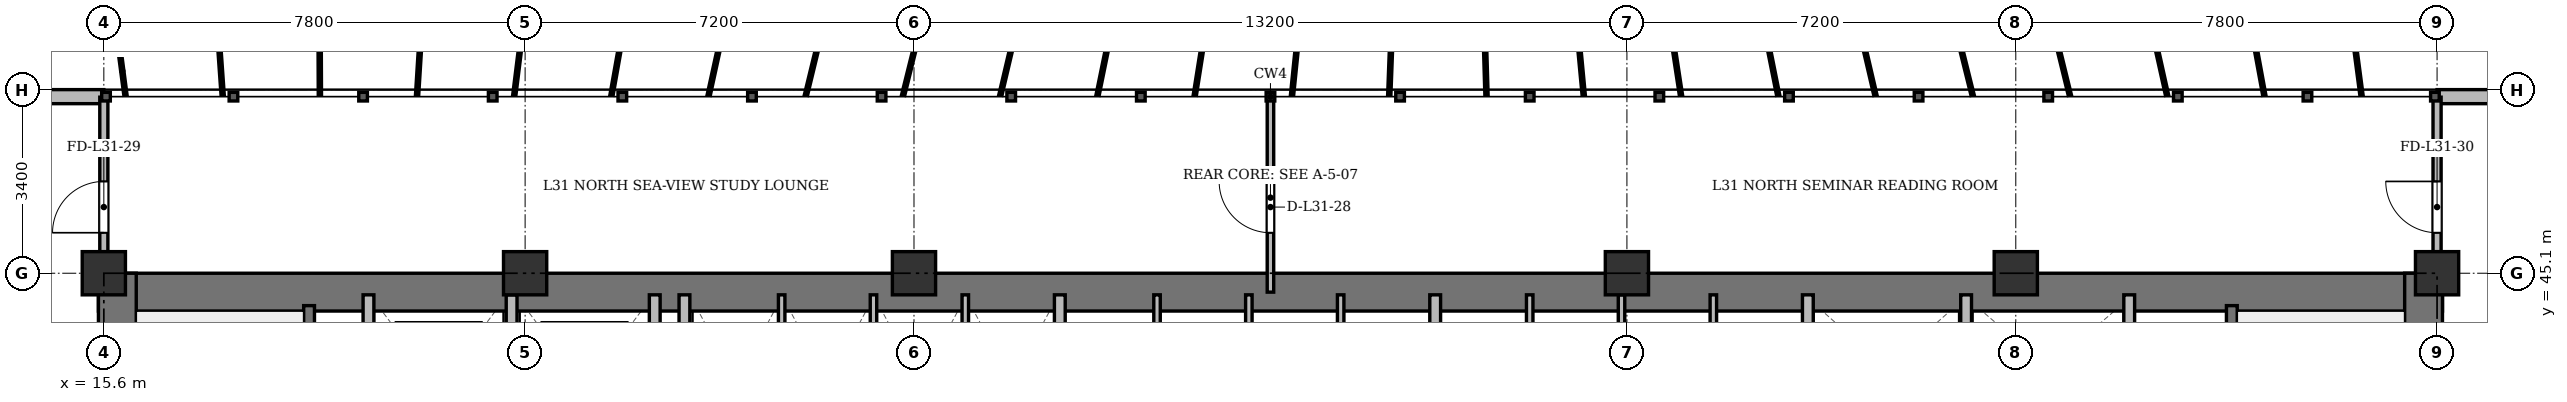
"""IFC4 building model, lengths in metres.
Left out: names, types, materials, properties, quantities, classifications, styles, units other than length and angle.
Written with IfcOpenShell. Run it as: python <this file> out.ifc"""

import sys

from ifc_helpers import new_model, si_unit, direction, frame, frame_2d, origin, origin_2d, place, context, subcontext, project, spatial, rectangle, extrude, source, transform, mapped, element, fill, save


model = new_model("IFC4")
c1 = context("Model", 3, precision=1e-05, world=origin(), true_north=direction((0.0, 1.0)))
c2 = subcontext(c1, "Body", "Model", "MODEL_VIEW")
j1 = project(units=[si_unit("LENGTHUNIT", "METRE"), si_unit("PLANEANGLEUNIT", "RADIAN")], contexts=[c1])
p1 = place(None, origin())
s1 = spatial("IfcSite", under=j1, at=p1, CompositionType="ELEMENT")
p2 = place(p1, origin())
s2 = spatial("IfcBuilding", under=s1, at=p2, CompositionType="ELEMENT")
p3 = place(p2, frame((0.0, 0.0, 121.3)))
s3 = spatial("IfcBuildingStorey", under=s2, at=p3, CompositionType="ELEMENT", Elevation=121.3)
m1 = source(origin(), c2, "Body", "SweptSolid", [
    extrude(rectangle(XDim=0.8, YDim=0.8, at=origin_2d()), origin(), (0.0, 0.0, 1.0), 3.6),
])
for number, where, z_axis, x_axis in (
    (1, (15.6, 45.1, 0.0), (0.0, 0.0, 1.0), (1.0, 0.0, 0.0)),
    (2, (23.4, 45.1, 0.0), (0.0, 0.0, 1.0), (1.0, 0.0, 0.0)),
    (3, (30.6, 45.1, 0.0), (0.0, 0.0, 1.0), (1.0, 0.0, 0.0)),
    (4, (43.8, 45.1, 0.0), (0.0, 0.0, 1.0), (1.0, 0.0, 0.0)),
    (5, (51.0, 45.1, 0.0), (0.0, 0.0, 1.0), (1.0, 0.0, 0.0)),
    (6, (58.8, 45.1, 0.0), (0.0, 0.0, 1.0), (1.0, 0.0, 0.0)),
):
    element("IfcColumn", number, at=place(p3, frame(where, z_axis=z_axis, x_axis=x_axis)), inside=s3, PredefinedType="COLUMN", context=c2, shape_type="MappedRepresentation", body=[
        mapped(m1, transform((0.0, 0.0, 0.0), x_axis=(1.0, 0.0, 0.0), y_axis=(0.0, 1.0, 0.0), z_axis=(0.0, 0.0, 1.0), scale=1.0)),
    ])
p4 = place(p3, frame((7.6, 48.37, 0.0), z_axis=(0.0, 0.0, 1.0), x_axis=(1.0, 0.0, 0.0)))
e7 = element("IfcWall", 7, at=p4, inside=s3, PredefinedType="SOLIDWALL", context=c2, shape_type="SweptSolid", body=[
    extrude(rectangle(XDim=8.0, YDim=0.26, at=frame_2d((4.0, 0.0))), origin(), (0.0, 0.0, 1.0), 3.34),
])
p5 = place(p4, frame((3.325, 0.0, 0.9)))
e8 = element("IfcOpeningElement", 8, at=p5, cuts=e7, PredefinedType="OPENING", context=c2, shape_type="SweptSolid", body=[
    extrude(rectangle(XDim=1.35, YDim=1.5, at=frame_2d((0.675, 0.75))), frame((0.0, 0.14, 0.0), z_axis=(0.0, -1.0, 0.0), x_axis=(1.0, 0.0, 0.0)), (0.0, 0.0, 1.0), 0.28),
])
p6 = place(p3, frame((58.8, 48.37, 0.0), z_axis=(0.0, 0.0, 1.0), x_axis=(1.0, 0.0, 0.0)))
e9 = element("IfcWall", 9, at=p6, inside=s3, PredefinedType="SOLIDWALL", context=c2, shape_type="SweptSolid", body=[
    extrude(rectangle(XDim=8.0, YDim=0.26, at=frame_2d((4.0, 0.0))), origin(), (0.0, 0.0, 1.0), 3.34),
])
p7 = place(p6, frame((2.209, 0.0, 0.9)))
e10 = element("IfcOpeningElement", 10, at=p7, cuts=e9, PredefinedType="OPENING", context=c2, shape_type="SweptSolid", body=[
    extrude(rectangle(XDim=1.35, YDim=1.5, at=frame_2d((0.675, 0.75))), frame((0.0, 0.14, 0.0), z_axis=(0.0, -1.0, 0.0), x_axis=(1.0, 0.0, 0.0)), (0.0, 0.0, 1.0), 0.28),
])
p8 = place(p6, frame((6.033, 0.0, 0.9)))
e11 = element("IfcOpeningElement", 11, at=p8, cuts=e9, PredefinedType="OPENING", context=c2, shape_type="SweptSolid", body=[
    extrude(rectangle(XDim=1.2, YDim=1.65, at=frame_2d((0.6, 0.825))), frame((0.0, 0.14, 0.0), z_axis=(0.0, -1.0, 0.0), x_axis=(1.0, 0.0, 0.0)), (0.0, 0.0, 1.0), 0.28),
])
p9 = place(p3, frame((15.5, 44.75, 0.0), z_axis=(0.0, 0.0, 1.0), x_axis=(1.0, 0.0, 0.0)))
e12 = element("IfcWall", 12, at=p9, inside=s3, PredefinedType="SHEAR", context=c2, shape_type="SweptSolid", body=[
    extrude(rectangle(XDim=43.4, YDim=0.7, at=frame_2d((21.7, 0.0))), origin(), (0.0, 0.0, 1.0), 3.34),
])
for number, where, z_axis, x_axis in (
    (13, (15.85, 33.4, 0.0), (0.0, 0.0, 1.0), (0.0, 1.0, 0.0)),
    (14, (58.55, 33.4, 0.0), (0.0, 0.0, 1.0), (0.0, 1.0, 0.0)),
):
    element("IfcWall", number, at=place(p3, frame(where, z_axis=z_axis, x_axis=x_axis)), inside=s3, PredefinedType="SHEAR", context=c2, shape_type="SweptSolid", body=[
        extrude(rectangle(XDim=11.7, YDim=0.7, at=frame_2d((5.85, 0.0))), origin(), (0.0, 0.0, 1.0), 3.34),
    ])
p10 = place(p3, frame((19.4, 33.4, 0.0), z_axis=(0.0, 0.0, 1.0), x_axis=(0.0, 1.0, 0.0)))
e15 = element("IfcWall", 15, at=p10, inside=s3, PredefinedType="SHEAR", context=c2, shape_type="SweptSolid", body=[
    extrude(rectangle(XDim=11.1, YDim=0.2, at=frame_2d((5.55, 0.0))), origin(), (0.0, 0.0, 1.0), 3.34),
])
p11 = place(p10, frame((0.85, 0.0, 0.0)))
e16 = element("IfcOpeningElement", 16, at=p11, cuts=e15, PredefinedType="OPENING", context=c2, shape_type="SweptSolid", body=[
    extrude(rectangle(XDim=1.1, YDim=2.15, at=frame_2d((0.55, 1.075))), frame((0.0, 0.11, 0.0), z_axis=(0.0, -1.0, 0.0), x_axis=(1.0, 0.0, 0.0)), (0.0, 0.0, 1.0), 0.22),
])
p12 = place(p3, frame((55.0, 33.4, 0.0), z_axis=(0.0, 0.0, 1.0), x_axis=(0.0, 1.0, 0.0)))
e17 = element("IfcWall", 17, at=p12, inside=s3, PredefinedType="SHEAR", context=c2, shape_type="SweptSolid", body=[
    extrude(rectangle(XDim=11.1, YDim=0.2, at=frame_2d((5.55, 0.0))), origin(), (0.0, 0.0, 1.0), 3.34),
])
p13 = place(p12, frame((0.85, 0.0, 0.0)))
e18 = element("IfcOpeningElement", 18, at=p13, cuts=e17, PredefinedType="OPENING", context=c2, shape_type="SweptSolid", body=[
    extrude(rectangle(XDim=1.1, YDim=2.15, at=frame_2d((0.55, 1.075))), frame((0.0, 0.11, 0.0), z_axis=(0.0, -1.0, 0.0), x_axis=(1.0, 0.0, 0.0)), (0.0, 0.0, 1.0), 0.22),
])
for number, where, z_axis, x_axis in (
    (19, (20.5, 41.3, 0.0), (0.0, 0.0, 1.0), (0.0, 1.0, 0.0)),
    (20, (23.15, 41.3, 0.0), (0.0, 0.0, 1.0), (0.0, 1.0, 0.0)),
    (21, (25.8, 41.3, 0.0), (0.0, 0.0, 1.0), (0.0, 1.0, 0.0)),
):
    element("IfcWall", number, at=place(p3, frame(where, z_axis=z_axis, x_axis=x_axis)), inside=s3, PredefinedType="SOLIDWALL", context=c2, shape_type="SweptSolid", body=[
        extrude(rectangle(XDim=3.4, YDim=0.2, at=frame_2d((1.7, 0.0))), origin(), (0.0, 0.0, 1.0), 3.34),
    ])
p14 = place(p3, frame((26.35, 33.4, 0.0), z_axis=(0.0, 0.0, 1.0), x_axis=(0.0, 1.0, 0.0)))
e22 = element("IfcWall", 22, at=p14, inside=s3, PredefinedType="SOLIDWALL", context=c2, shape_type="SweptSolid", body=[
    extrude(rectangle(XDim=11.3, YDim=0.2, at=frame_2d((5.65, 0.0))), origin(), (0.0, 0.0, 1.0), 2.752),
])
p15 = place(p3, frame((33.3, 41.5, 0.0), z_axis=(0.0, 0.0, 1.0), x_axis=(0.0, 1.0, 0.0)))
e23 = element("IfcWall", 23, at=p15, inside=s3, PredefinedType="SOLIDWALL", context=c2, shape_type="SweptSolid", body=[
    extrude(rectangle(XDim=3.2, YDim=0.2, at=frame_2d((1.6, 0.0))), origin(), (0.0, 0.0, 1.0), 3.34),
])
for number, where, z_axis, x_axis in (
    (24, (28.15, 41.5, 0.0), (0.0, 0.0, 1.0), (0.0, 1.0, 0.0)),
    (25, (29.85, 41.5, 0.0), (0.0, 0.0, 1.0), (0.0, 1.0, 0.0)),
    (26, (31.55, 41.5, 0.0), (0.0, 0.0, 1.0), (0.0, 1.0, 0.0)),
    (27, (35.1, 41.5, 0.0), (0.0, 0.0, 1.0), (0.0, 1.0, 0.0)),
    (28, (36.8, 41.5, 0.0), (0.0, 0.0, 1.0), (0.0, 1.0, 0.0)),
    (29, (38.5, 41.5, 0.0), (0.0, 0.0, 1.0), (0.0, 1.0, 0.0)),
):
    element("IfcWall", number, at=place(p3, frame(where, z_axis=z_axis, x_axis=x_axis)), inside=s3, PredefinedType="PARTITIONING", context=c2, shape_type="SweptSolid", body=[
        extrude(rectangle(XDim=3.2, YDim=0.12, at=frame_2d((1.6, 0.0))), origin(), (0.0, 0.0, 1.0), 3.34),
    ])
p16 = place(p3, frame((40.25, 41.5, 0.0), z_axis=(0.0, 0.0, 1.0), x_axis=(0.0, 1.0, 0.0)))
e30 = element("IfcWall", 30, at=p16, inside=s3, PredefinedType="SOLIDWALL", context=c2, shape_type="SweptSolid", body=[
    extrude(rectangle(XDim=3.2, YDim=0.2, at=frame_2d((1.6, 0.0))), origin(), (0.0, 0.0, 1.0), 3.34),
])
p17 = place(p3, frame((42.0, 41.5, 0.0), z_axis=(0.0, 0.0, 1.0), x_axis=(0.0, 1.0, 0.0)))
e31 = element("IfcWall", 31, at=p17, inside=s3, PredefinedType="PARTITIONING", context=c2, shape_type="SweptSolid", body=[
    extrude(rectangle(XDim=3.2, YDim=0.12, at=frame_2d((1.6, 0.0))), origin(), (0.0, 0.0, 1.0), 3.34),
])
p18 = place(p3, frame((43.7, 41.5, 0.0), z_axis=(0.0, 0.0, 1.0), x_axis=(0.0, 1.0, 0.0)))
e32 = element("IfcWall", 32, at=p18, inside=s3, PredefinedType="PARTITIONING", context=c2, shape_type="SweptSolid", body=[
    extrude(rectangle(XDim=3.2, YDim=0.12, at=frame_2d((1.6, 0.0))), origin(), (0.0, 0.0, 1.0), 2.84),
])
p19 = place(p3, frame((45.4, 41.5, 0.0), z_axis=(0.0, 0.0, 1.0), x_axis=(0.0, 1.0, 0.0)))
e33 = element("IfcWall", 33, at=p19, inside=s3, PredefinedType="PARTITIONING", context=c2, shape_type="SweptSolid", body=[
    extrude(rectangle(XDim=3.2, YDim=0.12, at=frame_2d((1.6, 0.0))), origin(), (0.0, 0.0, 1.0), 3.34),
])
p20 = place(p3, frame((47.15, 33.4, 0.0), z_axis=(0.0, 0.0, 1.0), x_axis=(0.0, 1.0, 0.0)))
e34 = element("IfcWall", 34, at=p20, inside=s3, PredefinedType="SOLIDWALL", context=c2, shape_type="SweptSolid", body=[
    extrude(rectangle(XDim=11.3, YDim=0.2, at=frame_2d((5.65, 0.0))), origin(), (0.0, 0.0, 1.0), 2.752),
])
for number, where, z_axis, x_axis in (
    (35, (50.08, 42.05, 0.0), (0.0, 0.0, 1.0), (0.0, 1.0, 0.0)),
    (36, (53.1, 42.05, 0.0), (0.0, 0.0, 1.0), (0.0, 1.0, 0.0)),
):
    element("IfcWall", number, at=place(p3, frame(where, z_axis=z_axis, x_axis=x_axis)), inside=s3, PredefinedType="SOLIDWALL", context=c2, shape_type="SweptSolid", body=[
        extrude(rectangle(XDim=2.65, YDim=0.2, at=frame_2d((1.325, 0.0))), origin(), (0.0, 0.0, 1.0), 3.34),
    ])
p21 = place(p3, frame((37.2, 44.75, 0.0), z_axis=(0.0, 0.0, 1.0), x_axis=(0.0, 1.0, 0.0)))
e37 = element("IfcWall", 37, at=p21, inside=s3, PredefinedType="PARTITIONING", context=c2, shape_type="SweptSolid", body=[
    extrude(rectangle(XDim=3.61, YDim=0.12, at=frame_2d((1.805, 0.0))), origin(), (0.0, 0.0, 1.0), 2.752),
])
p22 = place(p21, frame((1.1, 0.0, 0.0)))
e38 = element("IfcOpeningElement", 38, at=p22, cuts=e37, PredefinedType="OPENING", context=c2, shape_type="SweptSolid", body=[
    extrude(rectangle(XDim=0.95, YDim=2.15, at=frame_2d((0.475, 1.075))), frame((0.0, 0.07, 0.0), z_axis=(0.0, -1.0, 0.0), x_axis=(1.0, 0.0, 0.0)), (0.0, 0.0, 1.0), 0.14),
])
p23 = place(p3, frame((15.6, 44.75, 0.0), z_axis=(0.0, 0.0, 1.0), x_axis=(0.0, 1.0, 0.0)))
e39 = element("IfcWall", 39, at=p23, inside=s3, PredefinedType="PARTITIONING", context=c2, shape_type="SweptSolid", body=[
    extrude(rectangle(XDim=3.61, YDim=0.15, at=frame_2d((1.805, 0.0))), origin(), (0.0, 0.0, 1.0), 2.84),
])
p24 = place(p23, frame((1.1, 0.0, 0.0)))
e40 = element("IfcOpeningElement", 40, at=p24, cuts=e39, PredefinedType="OPENING", context=c2, shape_type="SweptSolid", body=[
    extrude(rectangle(XDim=0.95, YDim=2.15, at=frame_2d((0.475, 1.075))), frame((0.0, 0.085, 0.0), z_axis=(0.0, -1.0, 0.0), x_axis=(1.0, 0.0, 0.0)), (0.0, 0.0, 1.0), 0.17),
])
p25 = place(p3, frame((58.8, 44.75, 0.0), z_axis=(0.0, 0.0, 1.0), x_axis=(0.0, 1.0, 0.0)))
e41 = element("IfcWall", 41, at=p25, inside=s3, PredefinedType="PARTITIONING", context=c2, shape_type="SweptSolid", body=[
    extrude(rectangle(XDim=3.61, YDim=0.15, at=frame_2d((1.805, 0.0))), origin(), (0.0, 0.0, 1.0), 2.84),
])
p26 = place(p25, frame((1.1, 0.0, 0.0)))
e42 = element("IfcOpeningElement", 42, at=p26, cuts=e41, PredefinedType="OPENING", context=c2, shape_type="SweptSolid", body=[
    extrude(rectangle(XDim=0.95, YDim=2.15, at=frame_2d((0.475, 1.075))), frame((0.0, 0.085, 0.0), z_axis=(0.0, -1.0, 0.0), x_axis=(1.0, 0.0, 0.0)), (0.0, 0.0, 1.0), 0.17),
])
m2 = source(origin(), c2, "Body", "SweptSolid", [
    extrude(rectangle(XDim=0.95, YDim=2.15, at=frame_2d((0.475, 1.075))), frame((0.0, 0.025, 0.0), z_axis=(0.0, -1.0, 0.0), x_axis=(1.0, 0.0, 0.0)), (0.0, 0.0, 1.0), 0.05),
])
p27 = place(p22, origin())
e43 = element("IfcDoor", 43, at=p27, inside=s3, OperationType="SINGLE_SWING_RIGHT", PredefinedType="DOOR", context=c2, shape_type="MappedRepresentation", body=[
    mapped(m2, transform((0.0, 0.0, 0.0), x_axis=(1.0, 0.0, 0.0), y_axis=(0.0, 1.0, 0.0), z_axis=(0.0, 0.0, 1.0), scale=1.0)),
])
fill(e38, e43)
p28 = place(p24, origin())
e44 = element("IfcDoor", 44, at=p28, inside=s3, OperationType="SINGLE_SWING_LEFT", PredefinedType="DOOR", context=c2, shape_type="MappedRepresentation", body=[
    mapped(m2, transform((0.0, 0.0, 0.0), x_axis=(1.0, 0.0, 0.0), y_axis=(0.0, 1.0, 0.0), z_axis=(0.0, 0.0, 1.0), scale=1.0)),
])
fill(e40, e44)
p29 = place(p26, origin())
e45 = element("IfcDoor", 45, at=p29, inside=s3, OperationType="SINGLE_SWING_RIGHT", PredefinedType="DOOR", context=c2, shape_type="MappedRepresentation", body=[
    mapped(m2, transform((0.0, 0.0, 0.0), x_axis=(1.0, 0.0, 0.0), y_axis=(0.0, 1.0, 0.0), z_axis=(0.0, 0.0, 1.0), scale=1.0)),
])
fill(e42, e45)
save(model, sys.argv[1])
